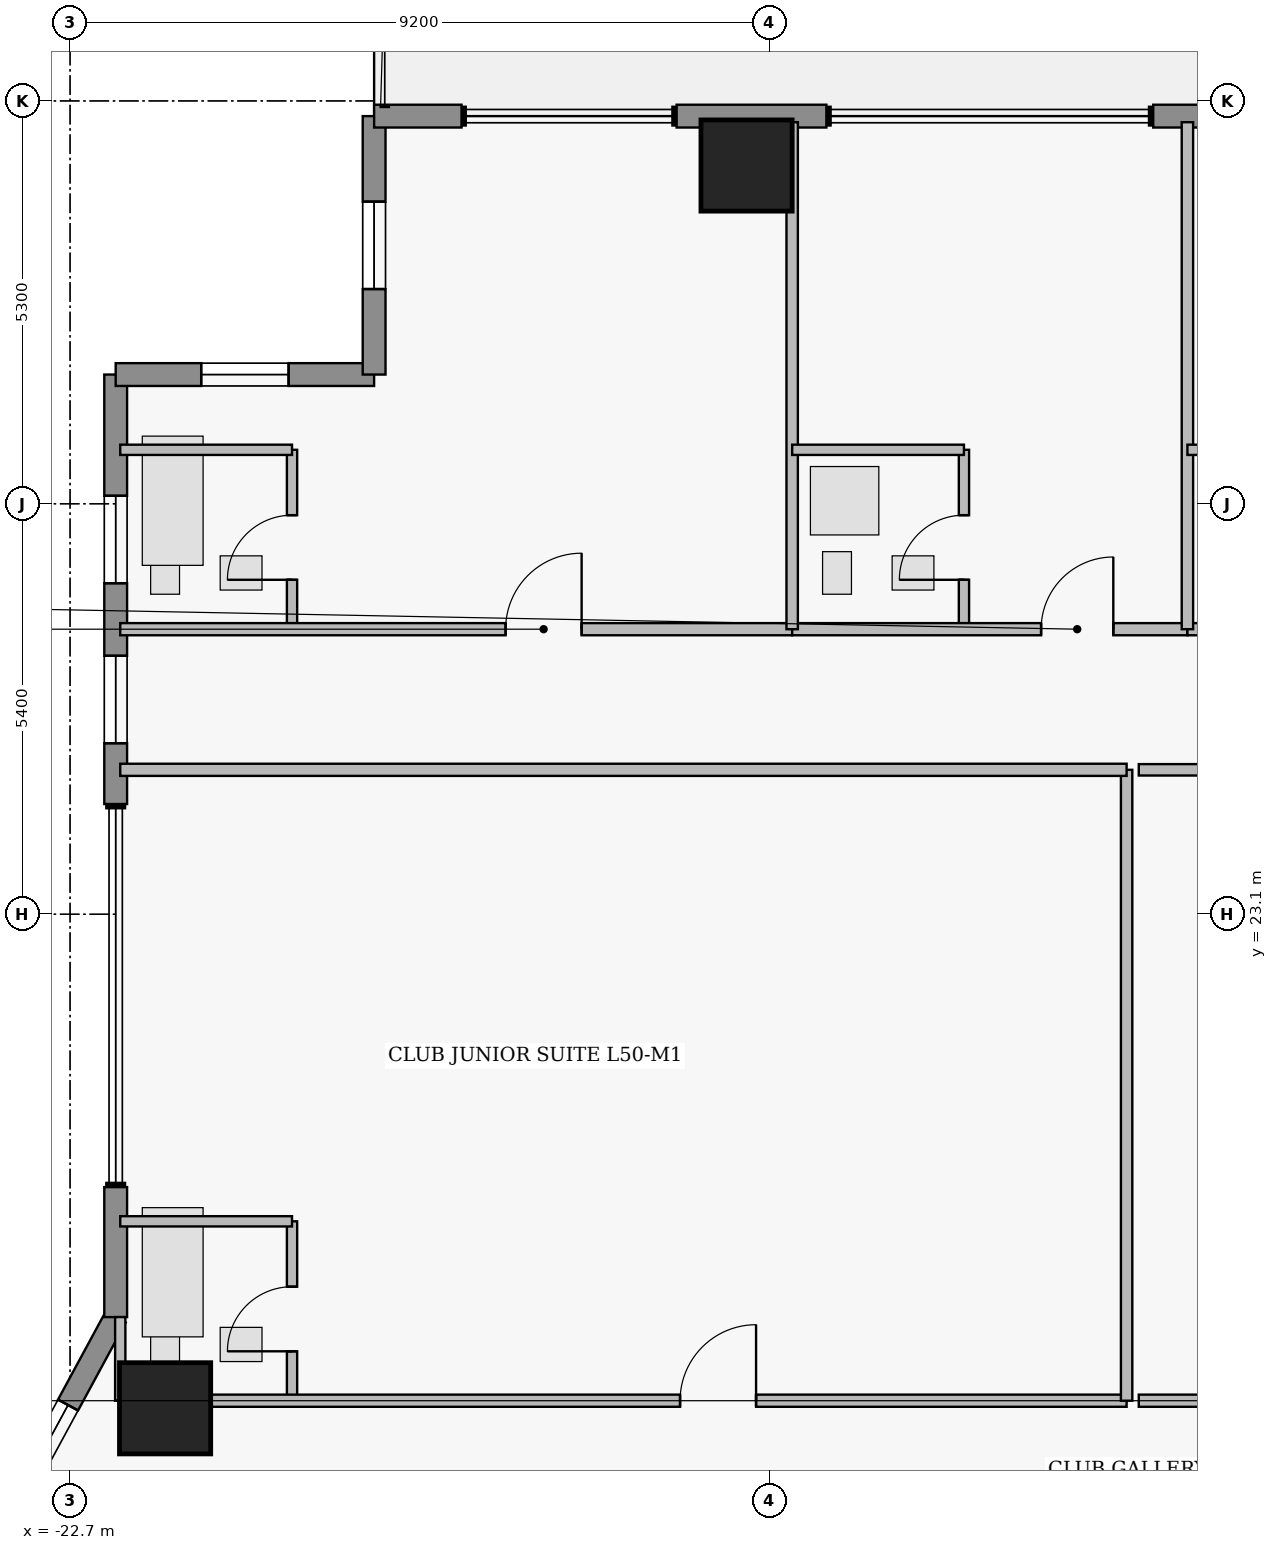
"""IFC4 building model, lengths in metres.
Left out: names, types, materials, properties, quantities, classifications, styles, units other than length and angle.
Written with IfcOpenShell. Run it as: python <this file> out.ifc"""

import sys

from ifc_helpers import new_model, si_unit, direction, frame, frame_2d, origin, origin_2d, place, context, subcontext, project, spatial, rectangle, extrude, element, fill, save


model = new_model("IFC4")
c1 = context("Model", 3, precision=1e-05, world=origin(), true_north=direction((0.0, 1.0)))
c2 = subcontext(c1, "Body", "Model", "MODEL_VIEW")
j1 = project(units=[si_unit("LENGTHUNIT", "METRE"), si_unit("PLANEANGLEUNIT", "RADIAN")], contexts=[c1])
p1 = place(None, origin())
s1 = spatial("IfcSite", under=j1, at=p1, CompositionType="ELEMENT")
p2 = place(p1, origin())
s2 = spatial("IfcBuilding", under=s1, at=p2, CompositionType="ELEMENT")
p3 = place(p2, frame((0.0, 0.0, 199.9)))
s3 = spatial("IfcBuildingStorey", under=s2, at=p3, CompositionType="ELEMENT", Elevation=199.9)
for number, where, z_axis, x_axis in (
    (1, (-13.8, 32.95, 0.0), (0.0, 0.0, 1.0), (1.0, 0.0, 0.0)),
    (2, (-21.45, 16.6, 0.0), (0.0, 0.0, 1.0), (1.0, 0.0, 0.0)),
):
    element("IfcColumn", number, at=place(p3, frame(where, z_axis=z_axis, x_axis=x_axis)), inside=s3, PredefinedType="COLUMN", context=c2, shape_type="SweptSolid", body=[
        extrude(rectangle(XDim=1.2, YDim=1.2, at=origin_2d()), origin(), (0.0, 0.0, 1.0), 3.75),
    ])
p4 = place(p3, frame((-24.7, 13.0, 0.0), z_axis=(0.0, 0.0, 1.0), x_axis=(0.476258655584, 0.879305233114, 0.0)))
e3 = element("IfcWall", 3, at=p4, inside=s3, PredefinedType="STANDARD", context=c2, shape_type="SweptSolid", body=[
    extrude(rectangle(XDim=5.459, YDim=0.3, at=frame_2d((2.729, 0.0))), origin(), (0.0, 0.0, 1.0), 3.53),
])
p5 = place(p4, frame((2.993, 0.0, 1.25)))
e4 = element("IfcOpeningElement", 4, at=p5, cuts=e3, PredefinedType="OPENING", context=c2, shape_type="SweptSolid", body=[
    extrude(rectangle(XDim=1.15, YDim=1.55, at=frame_2d((0.575, 0.775))), frame((0.0, 0.16, 0.0), z_axis=(0.0, -1.0, 0.0), x_axis=(1.0, 0.0, 0.0)), (0.0, 0.0, 1.0), 0.32),
])
p6 = place(p3, frame((-22.1, 17.8, 0.0), z_axis=(0.0, 0.0, 1.0), x_axis=(0.0, 1.0, 0.0)))
e5 = element("IfcWall", 5, at=p6, inside=s3, PredefinedType="STANDARD", context=c2, shape_type="SweptSolid", body=[
    extrude(rectangle(XDim=1.71, YDim=0.3, at=frame_2d((0.855, 0.0))), origin(), (0.0, 0.0, 1.0), 3.53),
])
p7 = place(p3, frame((-22.1, 24.55, 0.0), z_axis=(0.0, 0.0, 1.0), x_axis=(0.0, 1.0, 0.0)))
e6 = element("IfcWall", 6, at=p7, inside=s3, PredefinedType="STANDARD", context=c2, shape_type="SweptSolid", body=[
    extrude(rectangle(XDim=5.65, YDim=0.3, at=frame_2d((2.825, 0.0))), origin(), (0.0, 0.0, 1.0), 3.53),
])
p8 = place(p7, frame((0.8, 0.0, 0.95)))
e7 = element("IfcOpeningElement", 7, at=p8, cuts=e6, PredefinedType="OPENING", context=c2, shape_type="SweptSolid", body=[
    extrude(rectangle(XDim=1.15, YDim=1.55, at=frame_2d((0.575, 0.775))), frame((0.0, 0.16, 0.0), z_axis=(0.0, -1.0, 0.0), x_axis=(1.0, 0.0, 0.0)), (0.0, 0.0, 1.0), 0.32),
])
p9 = place(p7, frame((2.905, 0.0, 0.95)))
e8 = element("IfcOpeningElement", 8, at=p9, cuts=e6, PredefinedType="OPENING", context=c2, shape_type="SweptSolid", body=[
    extrude(rectangle(XDim=1.15, YDim=1.55, at=frame_2d((0.575, 0.775))), frame((0.0, 0.16, 0.0), z_axis=(0.0, -1.0, 0.0), x_axis=(1.0, 0.0, 0.0)), (0.0, 0.0, 1.0), 0.32),
])
p10 = place(p3, frame((-22.1, 30.2, 0.0), z_axis=(0.0, 0.0, 1.0), x_axis=(1.0, 0.0, 0.0)))
e9 = element("IfcWall", 9, at=p10, inside=s3, PredefinedType="STANDARD", context=c2, shape_type="SweptSolid", body=[
    extrude(rectangle(XDim=3.4, YDim=0.3, at=frame_2d((1.7, 0.0))), origin(), (0.0, 0.0, 1.0), 3.53),
])
p11 = place(p10, frame((1.125, 0.0, 1.25)))
e10 = element("IfcOpeningElement", 10, at=p11, cuts=e9, PredefinedType="OPENING", context=c2, shape_type="SweptSolid", body=[
    extrude(rectangle(XDim=1.15, YDim=1.55, at=frame_2d((0.575, 0.775))), frame((0.0, 0.16, 0.0), z_axis=(0.0, -1.0, 0.0), x_axis=(1.0, 0.0, 0.0)), (0.0, 0.0, 1.0), 0.32),
])
p12 = place(p3, frame((-18.7, 30.2, 0.0), z_axis=(0.0, 0.0, 1.0), x_axis=(0.0, 1.0, 0.0)))
e11 = element("IfcWall", 11, at=p12, inside=s3, PredefinedType="STANDARD", context=c2, shape_type="SweptSolid", body=[
    extrude(rectangle(XDim=3.4, YDim=0.3, at=frame_2d((1.7, 0.0))), origin(), (0.0, 0.0, 1.0), 3.53),
])
p13 = place(p12, frame((1.125, 0.0, 1.25)))
e12 = element("IfcOpeningElement", 12, at=p13, cuts=e11, PredefinedType="OPENING", context=c2, shape_type="SweptSolid", body=[
    extrude(rectangle(XDim=1.15, YDim=1.55, at=frame_2d((0.575, 0.775))), frame((0.0, 0.16, 0.0), z_axis=(0.0, -1.0, 0.0), x_axis=(1.0, 0.0, 0.0)), (0.0, 0.0, 1.0), 0.32),
])
p14 = place(p3, frame((-18.7, 33.6, 0.0), z_axis=(0.0, 0.0, 1.0), x_axis=(1.0, 0.0, 0.0)))
e13 = element("IfcWall", 13, at=p14, inside=s3, PredefinedType="STANDARD", context=c2, shape_type="SweptSolid", body=[
    extrude(rectangle(XDim=1.15, YDim=0.3, at=frame_2d((0.575, 0.0))), origin(), (0.0, 0.0, 1.0), 3.53),
])
p15 = place(p3, frame((-14.72, 33.6, 0.0), z_axis=(0.0, 0.0, 1.0), x_axis=(1.0, 0.0, 0.0)))
e14 = element("IfcWall", 14, at=p15, inside=s3, PredefinedType="STANDARD", context=c2, shape_type="SweptSolid", body=[
    extrude(rectangle(XDim=1.97, YDim=0.3, at=frame_2d((0.985, 0.0))), origin(), (0.0, 0.0, 1.0), 3.53),
])
p16 = place(p3, frame((-8.45, 33.6, 0.0), z_axis=(0.0, 0.0, 1.0), x_axis=(1.0, 0.0, 0.0)))
e15 = element("IfcWall", 15, at=p16, inside=s3, PredefinedType="STANDARD", context=c2, shape_type="SweptSolid", body=[
    extrude(rectangle(XDim=19.045, YDim=0.3, at=frame_2d((9.522, 0.0))), origin(), (0.0, 0.0, 1.0), 3.53),
])
p17 = place(p16, frame((17.345, 0.0, 0.0)))
e16 = element("IfcOpeningElement", 16, at=p17, cuts=e15, PredefinedType="OPENING", context=c2, shape_type="SweptSolid", body=[
    extrude(rectangle(XDim=1.05, YDim=2.2, at=frame_2d((0.525, 1.1))), frame((0.0, 0.16, 0.0), z_axis=(0.0, -1.0, 0.0), x_axis=(1.0, 0.0, 0.0)), (0.0, 0.0, 1.0), 0.32),
])
p18 = place(p16, frame((7.45, 0.0, 0.85)))
e17 = element("IfcOpeningElement", 17, at=p18, cuts=e15, PredefinedType="OPENING", context=c2, shape_type="SweptSolid", body=[
    extrude(rectangle(XDim=1.6, YDim=1.8, at=frame_2d((0.8, 0.9))), frame((0.0, 0.16, 0.0), z_axis=(0.0, -1.0, 0.0), x_axis=(1.0, 0.0, 0.0)), (0.0, 0.0, 1.0), 0.32),
])
p19 = place(p16, frame((1.06, 0.0, 0.85)))
e18 = element("IfcOpeningElement", 18, at=p19, cuts=e15, PredefinedType="OPENING", context=c2, shape_type="SweptSolid", body=[
    extrude(rectangle(XDim=1.6, YDim=1.8, at=frame_2d((0.8, 0.9))), frame((0.0, 0.16, 0.0), z_axis=(0.0, -1.0, 0.0), x_axis=(1.0, 0.0, 0.0)), (0.0, 0.0, 1.0), 0.32),
])
p20 = place(p16, frame((14.14, 0.0, 0.85)))
e19 = element("IfcOpeningElement", 19, at=p20, cuts=e15, PredefinedType="OPENING", context=c2, shape_type="SweptSolid", body=[
    extrude(rectangle(XDim=1.6, YDim=1.8, at=frame_2d((0.8, 0.9))), frame((0.0, 0.16, 0.0), z_axis=(0.0, -1.0, 0.0), x_axis=(1.0, 0.0, 0.0)), (0.0, 0.0, 1.0), 0.32),
])
p21 = place(p3, frame((-19.78, 26.85, 0.0), z_axis=(0.0, 0.0, 1.0), x_axis=(0.0, 1.0, 0.0)))
e20 = element("IfcWall", 20, at=p21, inside=s3, PredefinedType="PLUMBINGWALL", context=c2, shape_type="SweptSolid", body=[
    extrude(rectangle(XDim=2.36, YDim=0.135, at=frame_2d((1.18, 0.0))), origin(), (0.0, 0.0, 1.0), 3.53),
])
p22 = place(p21, frame((0.65, 0.0, 0.0)))
e21 = element("IfcOpeningElement", 21, at=p22, cuts=e20, PredefinedType="OPENING", context=c2, shape_type="SweptSolid", body=[
    extrude(rectangle(XDim=0.85, YDim=2.1, at=frame_2d((0.425, 1.05))), frame((0.0, 0.077, 0.0), z_axis=(0.0, -1.0, 0.0), x_axis=(1.0, 0.0, 0.0)), (0.0, 0.0, 1.0), 0.155),
])
p23 = place(p3, frame((-22.04, 26.85, 0.0), z_axis=(0.0, 0.0, 1.0), x_axis=(1.0, 0.0, 0.0)))
e22 = element("IfcWall", 22, at=p23, inside=s3, PredefinedType="PARTITIONING", context=c2, shape_type="SweptSolid", body=[
    extrude(rectangle(XDim=8.84, YDim=0.16, at=frame_2d((4.42, 0.0))), origin(), (0.0, 0.0, 1.0), 3.53),
])
p24 = place(p23, frame((5.07, 0.0, 0.0)))
e23 = element("IfcOpeningElement", 23, at=p24, cuts=e22, PredefinedType="OPENING", context=c2, shape_type="SweptSolid", body=[
    extrude(rectangle(XDim=1.0, YDim=2.15, at=frame_2d((0.5, 1.075))), frame((0.0, 0.09, 0.0), z_axis=(0.0, -1.0, 0.0), x_axis=(1.0, 0.0, 0.0)), (0.0, 0.0, 1.0), 0.18),
])
p25 = place(p3, frame((-10.94, 26.85, 0.0), z_axis=(0.0, 0.0, 1.0), x_axis=(0.0, 1.0, 0.0)))
e24 = element("IfcWall", 24, at=p25, inside=s3, PredefinedType="PLUMBINGWALL", context=c2, shape_type="SweptSolid", body=[
    extrude(rectangle(XDim=2.36, YDim=0.135, at=frame_2d((1.18, 0.0))), origin(), (0.0, 0.0, 1.0), 3.53),
])
p26 = place(p25, frame((0.65, 0.0, 0.0)))
e25 = element("IfcOpeningElement", 25, at=p26, cuts=e24, PredefinedType="OPENING", context=c2, shape_type="SweptSolid", body=[
    extrude(rectangle(XDim=0.85, YDim=2.1, at=frame_2d((0.425, 1.05))), frame((0.0, 0.077, 0.0), z_axis=(0.0, -1.0, 0.0), x_axis=(1.0, 0.0, 0.0)), (0.0, 0.0, 1.0), 0.155),
])
p27 = place(p3, frame((-13.2, 26.85, 0.0), z_axis=(0.0, 0.0, 1.0), x_axis=(1.0, 0.0, 0.0)))
e26 = element("IfcWall", 26, at=p27, inside=s3, PredefinedType="PARTITIONING", context=c2, shape_type="SweptSolid", body=[
    extrude(rectangle(XDim=5.2, YDim=0.16, at=frame_2d((2.6, 0.0))), origin(), (0.0, 0.0, 1.0), 3.53),
])
p28 = place(p27, frame((3.275, 0.0, 0.0)))
e27 = element("IfcOpeningElement", 27, at=p28, cuts=e26, PredefinedType="OPENING", context=c2, shape_type="SweptSolid", body=[
    extrude(rectangle(XDim=0.95, YDim=2.15, at=frame_2d((0.475, 1.075))), frame((0.0, 0.09, 0.0), z_axis=(0.0, -1.0, 0.0), x_axis=(1.0, 0.0, 0.0)), (0.0, 0.0, 1.0), 0.18),
])
p29 = place(p3, frame((-8.0, 26.85, 0.0), z_axis=(0.0, 0.0, 1.0), x_axis=(1.0, 0.0, 0.0)))
e28 = element("IfcWall", 28, at=p29, inside=s3, PredefinedType="PARTITIONING", context=c2, shape_type="SweptSolid", body=[
    extrude(rectangle(XDim=5.2, YDim=0.16, at=frame_2d((2.6, 0.0))), origin(), (0.0, 0.0, 1.0), 3.53),
])
p30 = place(p29, frame((3.275, 0.0, 0.0)))
e29 = element("IfcOpeningElement", 29, at=p30, cuts=e28, PredefinedType="OPENING", context=c2, shape_type="SweptSolid", body=[
    extrude(rectangle(XDim=0.95, YDim=2.15, at=frame_2d((0.475, 1.075))), frame((0.0, 0.09, 0.0), z_axis=(0.0, -1.0, 0.0), x_axis=(1.0, 0.0, 0.0)), (0.0, 0.0, 1.0), 0.18),
])
p31 = place(p3, frame((-19.78, 16.7, 0.0), z_axis=(0.0, 0.0, 1.0), x_axis=(0.0, 1.0, 0.0)))
e30 = element("IfcWall", 30, at=p31, inside=s3, PredefinedType="PLUMBINGWALL", context=c2, shape_type="SweptSolid", body=[
    extrude(rectangle(XDim=2.36, YDim=0.135, at=frame_2d((1.18, 0.0))), origin(), (0.0, 0.0, 1.0), 3.53),
])
p32 = place(p31, frame((0.65, 0.0, 0.0)))
e31 = element("IfcOpeningElement", 31, at=p32, cuts=e30, PredefinedType="OPENING", context=c2, shape_type="SweptSolid", body=[
    extrude(rectangle(XDim=0.85, YDim=2.1, at=frame_2d((0.425, 1.05))), frame((0.0, 0.077, 0.0), z_axis=(0.0, -1.0, 0.0), x_axis=(1.0, 0.0, 0.0)), (0.0, 0.0, 1.0), 0.155),
])
p33 = place(p3, frame((-22.04, 16.7, 0.0), z_axis=(0.0, 0.0, 1.0), x_axis=(1.0, 0.0, 0.0)))
e32 = element("IfcWall", 32, at=p33, inside=s3, PredefinedType="PARTITIONING", context=c2, shape_type="SweptSolid", body=[
    extrude(rectangle(XDim=13.24, YDim=0.16, at=frame_2d((6.62, 0.0))), origin(), (0.0, 0.0, 1.0), 3.124),
])
p34 = place(p33, frame((7.365, 0.0, 0.0)))
e33 = element("IfcOpeningElement", 33, at=p34, cuts=e32, PredefinedType="OPENING", context=c2, shape_type="SweptSolid", body=[
    extrude(rectangle(XDim=1.0, YDim=2.15, at=frame_2d((0.5, 1.075))), frame((0.0, 0.09, 0.0), z_axis=(0.0, -1.0, 0.0), x_axis=(1.0, 0.0, 0.0)), (0.0, 0.0, 1.0), 0.18),
])
p35 = place(p3, frame((-8.64, 16.7, 0.0), z_axis=(0.0, 0.0, 1.0), x_axis=(1.0, 0.0, 0.0)))
e34 = element("IfcWall", 34, at=p35, inside=s3, PredefinedType="PARTITIONING", context=c2, shape_type="SweptSolid", body=[
    extrude(rectangle(XDim=7.66, YDim=0.16, at=frame_2d((3.83, 0.0))), origin(), (0.0, 0.0, 1.0), 3.124),
])
p36 = place(p35, frame((5.85, 0.0, 0.0)))
e35 = element("IfcOpeningElement", 35, at=p36, cuts=e34, PredefinedType="OPENING", context=c2, shape_type="SweptSolid", body=[
    extrude(rectangle(XDim=1.08, YDim=2.18, at=frame_2d((0.54, 1.09))), frame((0.0, 0.09, 0.0), z_axis=(0.0, -1.0, 0.0), x_axis=(1.0, 0.0, 0.0)), (0.0, 0.0, 1.0), 0.18),
])
p37 = place(p3, frame((-22.04, 29.21, 0.0), z_axis=(0.0, 0.0, 1.0), x_axis=(1.0, 0.0, 0.0)))
e36 = element("IfcWall", 36, at=p37, inside=s3, PredefinedType="PLUMBINGWALL", context=c2, shape_type="SweptSolid", body=[
    extrude(rectangle(XDim=2.26, YDim=0.135, at=frame_2d((1.13, 0.0))), origin(), (0.0, 0.0, 1.0), 3.53),
])
p38 = place(p3, frame((-13.2, 26.85, 0.0), z_axis=(0.0, 0.0, 1.0), x_axis=(0.0, 1.0, 0.0)))
e37 = element("IfcWall", 37, at=p38, inside=s3, PredefinedType="PARTITIONING", context=c2, shape_type="SweptSolid", body=[
    extrude(rectangle(XDim=6.67, YDim=0.15, at=frame_2d((3.335, 0.0))), origin(), (0.0, 0.0, 1.0), 3.53),
])
p39 = place(p3, frame((-13.2, 29.21, 0.0), z_axis=(0.0, 0.0, 1.0), x_axis=(1.0, 0.0, 0.0)))
e38 = element("IfcWall", 38, at=p39, inside=s3, PredefinedType="PLUMBINGWALL", context=c2, shape_type="SweptSolid", body=[
    extrude(rectangle(XDim=2.26, YDim=0.135, at=frame_2d((1.13, 0.0))), origin(), (0.0, 0.0, 1.0), 3.53),
])
p40 = place(p3, frame((-8.0, 26.85, 0.0), z_axis=(0.0, 0.0, 1.0), x_axis=(0.0, 1.0, 0.0)))
e39 = element("IfcWall", 39, at=p40, inside=s3, PredefinedType="PARTITIONING", context=c2, shape_type="SweptSolid", body=[
    extrude(rectangle(XDim=6.67, YDim=0.15, at=frame_2d((3.335, 0.0))), origin(), (0.0, 0.0, 1.0), 3.53),
])
for number, where, z_axis, x_axis in (
    (40, (-8.0, 29.21, 0.0), (0.0, 0.0, 1.0), (1.0, 0.0, 0.0)),
    (41, (-22.04, 19.06, 0.0), (0.0, 0.0, 1.0), (1.0, 0.0, 0.0)),
):
    element("IfcWall", number, at=place(p3, frame(where, z_axis=z_axis, x_axis=x_axis)), inside=s3, PredefinedType="PLUMBINGWALL", context=c2, shape_type="SweptSolid", body=[
        extrude(rectangle(XDim=2.26, YDim=0.135, at=frame_2d((1.13, 0.0))), origin(), (0.0, 0.0, 1.0), 3.53),
    ])
p41 = place(p3, frame((-22.04, 16.7, 0.0), z_axis=(0.0, 0.0, 1.0), x_axis=(0.0, 1.0, 0.0)))
e42 = element("IfcWall", 42, at=p41, inside=s3, PredefinedType="PLUMBINGWALL", context=c2, shape_type="SweptSolid", body=[
    extrude(rectangle(XDim=1.1, YDim=0.135, at=frame_2d((0.55, 0.0))), origin(), (0.0, 0.0, 1.0), 3.53),
])
p42 = place(p3, frame((-8.8, 16.7, 0.0), z_axis=(0.0, 0.0, 1.0), x_axis=(0.0, 1.0, 0.0)))
e43 = element("IfcWall", 43, at=p42, inside=s3, PredefinedType="PARTITIONING", context=c2, shape_type="SweptSolid", body=[
    extrude(rectangle(XDim=8.3, YDim=0.15, at=frame_2d((4.15, 0.0))), origin(), (0.0, 0.0, 1.0), 3.53),
])
p43 = place(p3, frame((-22.04, 25.0, 0.0), z_axis=(0.0, 0.0, 1.0), x_axis=(1.0, 0.0, 0.0)))
e44 = element("IfcWall", 44, at=p43, inside=s3, PredefinedType="PARTITIONING", context=c2, shape_type="SweptSolid", body=[
    extrude(rectangle(XDim=13.24, YDim=0.16, at=frame_2d((6.62, 0.0))), origin(), (0.0, 0.0, 1.0), 3.124),
])
p44 = place(p3, frame((-8.64, 25.0, 0.0), z_axis=(0.0, 0.0, 1.0), x_axis=(1.0, 0.0, 0.0)))
e45 = element("IfcWall", 45, at=p44, inside=s3, PredefinedType="PARTITIONING", context=c2, shape_type="SweptSolid", body=[
    extrude(rectangle(XDim=7.66, YDim=0.15, at=frame_2d((3.83, 0.0))), origin(), (0.0, 0.0, 1.0), 3.124),
])
p45 = place(p5, origin())
e46 = element("IfcWindow", 46, at=p45, inside=s3, PartitioningType="SINGLE_PANEL", PredefinedType="WINDOW", context=c2, shape_type="SweptSolid", body=[
    extrude(rectangle(XDim=1.15, YDim=1.55, at=frame_2d((0.575, 0.775))), frame((0.0, 0.03, 0.0), z_axis=(0.0, -1.0, 0.0), x_axis=(1.0, 0.0, 0.0)), (0.0, 0.0, 1.0), 0.06),
])
fill(e4, e46)
p46 = place(p8, origin())
e47 = element("IfcWindow", 47, at=p46, inside=s3, PartitioningType="SINGLE_PANEL", PredefinedType="WINDOW", context=c2, shape_type="SweptSolid", body=[
    extrude(rectangle(XDim=1.15, YDim=1.55, at=frame_2d((0.575, 0.775))), frame((0.0, 0.03, 0.0), z_axis=(0.0, -1.0, 0.0), x_axis=(1.0, 0.0, 0.0)), (0.0, 0.0, 1.0), 0.06),
])
fill(e7, e47)
p47 = place(p9, origin())
e48 = element("IfcWindow", 48, at=p47, inside=s3, PartitioningType="SINGLE_PANEL", PredefinedType="WINDOW", context=c2, shape_type="SweptSolid", body=[
    extrude(rectangle(XDim=1.15, YDim=1.55, at=frame_2d((0.575, 0.775))), frame((0.0, 0.03, 0.0), z_axis=(0.0, -1.0, 0.0), x_axis=(1.0, 0.0, 0.0)), (0.0, 0.0, 1.0), 0.06),
])
fill(e8, e48)
p48 = place(p11, origin())
e49 = element("IfcWindow", 49, at=p48, inside=s3, PartitioningType="SINGLE_PANEL", PredefinedType="WINDOW", context=c2, shape_type="SweptSolid", body=[
    extrude(rectangle(XDim=1.15, YDim=1.55, at=frame_2d((0.575, 0.775))), frame((0.0, 0.03, 0.0), z_axis=(0.0, -1.0, 0.0), x_axis=(1.0, 0.0, 0.0)), (0.0, 0.0, 1.0), 0.06),
])
fill(e10, e49)
p49 = place(p13, origin())
e50 = element("IfcWindow", 50, at=p49, inside=s3, PartitioningType="SINGLE_PANEL", PredefinedType="WINDOW", context=c2, shape_type="SweptSolid", body=[
    extrude(rectangle(XDim=1.15, YDim=1.55, at=frame_2d((0.575, 0.775))), frame((0.0, 0.03, 0.0), z_axis=(0.0, -1.0, 0.0), x_axis=(1.0, 0.0, 0.0)), (0.0, 0.0, 1.0), 0.06),
])
fill(e12, e50)
p50 = place(p22, origin())
e51 = element("IfcDoor", 51, at=p50, inside=s3, OperationType="SINGLE_SWING_LEFT", PredefinedType="DOOR", context=c2, shape_type="SweptSolid", body=[
    extrude(rectangle(XDim=0.85, YDim=2.1, at=frame_2d((0.425, 1.05))), frame((0.0, 0.025, 0.0), z_axis=(0.0, -1.0, 0.0), x_axis=(1.0, 0.0, 0.0)), (0.0, 0.0, 1.0), 0.05),
])
fill(e21, e51)
p51 = place(p24, origin())
e52 = element("IfcDoor", 52, at=p51, inside=s3, OperationType="SINGLE_SWING_RIGHT", PredefinedType="DOOR", context=c2, shape_type="SweptSolid", body=[
    extrude(rectangle(XDim=1.0, YDim=2.15, at=frame_2d((0.5, 1.075))), frame((0.0, 0.025, 0.0), z_axis=(0.0, -1.0, 0.0), x_axis=(1.0, 0.0, 0.0)), (0.0, 0.0, 1.0), 0.05),
])
fill(e23, e52)
p52 = place(p26, origin())
e53 = element("IfcDoor", 53, at=p52, inside=s3, OperationType="SINGLE_SWING_LEFT", PredefinedType="DOOR", context=c2, shape_type="SweptSolid", body=[
    extrude(rectangle(XDim=0.85, YDim=2.1, at=frame_2d((0.425, 1.05))), frame((0.0, 0.025, 0.0), z_axis=(0.0, -1.0, 0.0), x_axis=(1.0, 0.0, 0.0)), (0.0, 0.0, 1.0), 0.05),
])
fill(e25, e53)
p53 = place(p28, origin())
e54 = element("IfcDoor", 54, at=p53, inside=s3, OperationType="SINGLE_SWING_RIGHT", PredefinedType="DOOR", context=c2, shape_type="SweptSolid", body=[
    extrude(rectangle(XDim=0.95, YDim=2.15, at=frame_2d((0.475, 1.075))), frame((0.0, 0.025, 0.0), z_axis=(0.0, -1.0, 0.0), x_axis=(1.0, 0.0, 0.0)), (0.0, 0.0, 1.0), 0.05),
])
fill(e27, e54)
p54 = place(p32, origin())
e55 = element("IfcDoor", 55, at=p54, inside=s3, OperationType="SINGLE_SWING_LEFT", PredefinedType="DOOR", context=c2, shape_type="SweptSolid", body=[
    extrude(rectangle(XDim=0.85, YDim=2.1, at=frame_2d((0.425, 1.05))), frame((0.0, 0.025, 0.0), z_axis=(0.0, -1.0, 0.0), x_axis=(1.0, 0.0, 0.0)), (0.0, 0.0, 1.0), 0.05),
])
fill(e31, e55)
p55 = place(p34, origin())
e56 = element("IfcDoor", 56, at=p55, inside=s3, OperationType="SINGLE_SWING_RIGHT", PredefinedType="DOOR", context=c2, shape_type="SweptSolid", body=[
    extrude(rectangle(XDim=1.0, YDim=2.15, at=frame_2d((0.5, 1.075))), frame((0.0, 0.025, 0.0), z_axis=(0.0, -1.0, 0.0), x_axis=(1.0, 0.0, 0.0)), (0.0, 0.0, 1.0), 0.05),
])
fill(e33, e56)
save(model, sys.argv[1])
